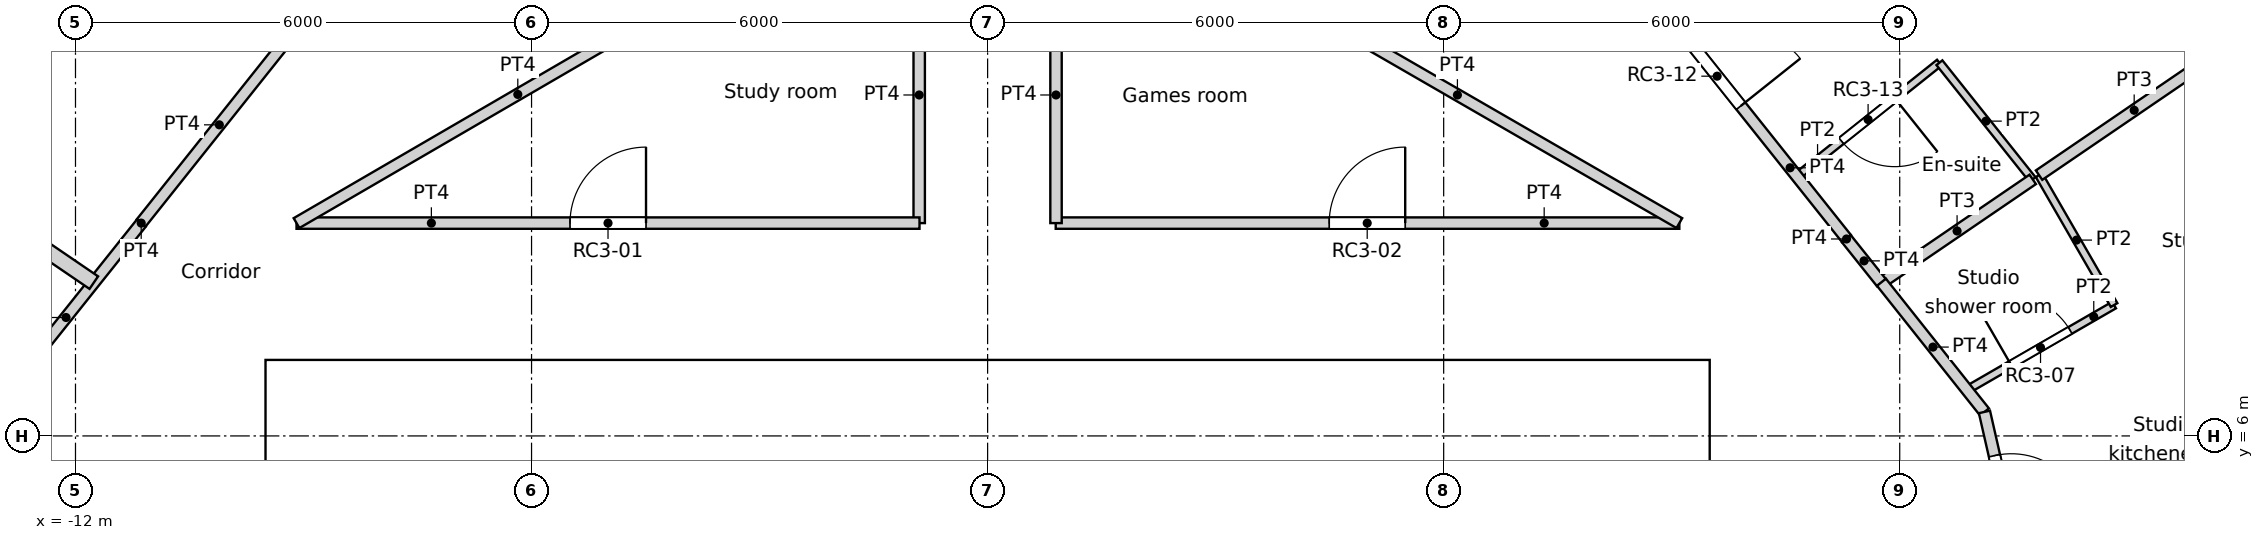
"""IFC4 building model, lengths in metres.
Left out: names, types, materials, properties, quantities, classifications, styles, units other than length and angle.
Written with IfcOpenShell. Run it as: python <this file> out.ifc"""

import sys

from ifc_helpers import new_model, si_unit, direction, frame, frame_2d, origin, origin_2d, place, context, subcontext, project, spatial, rectangle, circle, extrude, element, fill, save


model = new_model("IFC4")
c1 = context("Model", 3, precision=1e-05, world=origin(), true_north=direction((0.0, 1.0)))
c2 = subcontext(c1, "Body", "Model", "MODEL_VIEW")
j1 = project(units=[si_unit("LENGTHUNIT", "METRE"), si_unit("PLANEANGLEUNIT", "RADIAN")], contexts=[c1])
p1 = place(None, origin())
s1 = spatial("IfcSite", under=j1, at=p1, CompositionType="ELEMENT")
p2 = place(p1, origin())
s2 = spatial("IfcBuilding", under=s1, at=p2, CompositionType="ELEMENT")
p3 = place(p2, frame((0.0, 0.0, 252.6)))
s3 = spatial("IfcBuildingStorey", under=s2, at=p3, CompositionType="ELEMENT", Elevation=252.6)
p4 = place(p3, frame((15.552, 10.603, 0.0), z_axis=(0.0, 0.0, 1.0), x_axis=(1.0, 0.0, 0.0)))
e1 = element("IfcColumn", 1, at=p4, inside=s3, PredefinedType="COLUMN", context=c2, shape_type="SweptSolid", body=[
    extrude(circle(Radius=0.55, at=origin_2d()), origin(), (0.0, 0.0, 1.0), 3.6),
])
p5 = place(p3, frame((-9.5, 6.7, 0.0), z_axis=(0.0, 0.0, 1.0), x_axis=(1.0, 0.0, 0.0)))
e2 = element("IfcWall", 2, at=p5, inside=s3, PredefinedType="SOLIDWALL", context=c2, shape_type="SweptSolid", body=[
    extrude(rectangle(XDim=19.0, YDim=0.6, at=frame_2d((9.5, 0.0))), origin(), (0.0, 0.0, 1.0), 3.6),
])
p6 = place(p5, frame((5.35, 0.0, 0.0)))
e3 = element("IfcOpeningElement", 3, at=p6, cuts=e2, PredefinedType="OPENING", context=c2, shape_type="SweptSolid", body=[
    extrude(rectangle(XDim=1.7, YDim=2.1, at=frame_2d((0.85, 1.05))), frame((0.0, 0.3, 0.0), z_axis=(0.0, -1.0, 0.0), x_axis=(1.0, 0.0, 0.0)), (0.0, 0.0, 1.0), 0.6),
])
p7 = place(p3, frame((-9.2, -6.4, 0.0), z_axis=(0.0, 0.0, 1.0), x_axis=(0.0, 1.0, 0.0)))
e4 = element("IfcWall", 4, at=p7, inside=s3, PredefinedType="SOLIDWALL", context=c2, shape_type="SweptSolid", body=[
    extrude(rectangle(XDim=12.8, YDim=0.6, at=frame_2d((6.4, 0.0))), origin(), (0.0, 0.0, 1.0), 3.6),
])
p8 = place(p3, frame((9.2, -6.4, 0.0), z_axis=(0.0, 0.0, 1.0), x_axis=(0.0, 1.0, 0.0)))
e5 = element("IfcWall", 5, at=p8, inside=s3, PredefinedType="SOLIDWALL", context=c2, shape_type="SweptSolid", body=[
    extrude(rectangle(XDim=12.8, YDim=0.6, at=frame_2d((6.4, 0.0))), origin(), (0.0, 0.0, 1.0), 3.6),
])
p9 = place(p8, frame((6.4, 0.0, 0.0)))
e6 = element("IfcOpeningElement", 6, at=p9, cuts=e5, PredefinedType="OPENING", context=c2, shape_type="SweptSolid", body=[
    extrude(rectangle(XDim=1.8, YDim=2.1, at=frame_2d((0.9, 1.05))), frame((0.0, 0.3, 0.0), z_axis=(0.0, -1.0, 0.0), x_axis=(1.0, 0.0, 0.0)), (0.0, 0.0, 1.0), 0.6),
])
for number, where, z_axis, x_axis in (
    (7, (-2.25, 3.25, 0.0), (0.0, 0.0, 1.0), (0.0, 1.0, 0.0)),
    (8, (0.55, 3.25, 0.0), (0.0, 0.0, 1.0), (0.0, 1.0, 0.0)),
    (9, (3.35, 3.25, 0.0), (0.0, 0.0, 1.0), (0.0, 1.0, 0.0)),
    (10, (6.15, 3.25, 0.0), (0.0, 0.0, 1.0), (0.0, 1.0, 0.0)),
):
    element("IfcWall", number, at=place(p3, frame(where, z_axis=z_axis, x_axis=x_axis)), inside=s3, PredefinedType="SOLIDWALL", context=c2, shape_type="SweptSolid", body=[
        extrude(rectangle(XDim=3.15, YDim=0.3, at=frame_2d((1.575, 0.0))), origin(), (0.0, 0.0, 1.0), 3.25),
    ])
p10 = place(p3, frame((-9.092, 8.8, 0.0), z_axis=(0.0, 0.0, 1.0), x_axis=(0.864470922103, 0.502682827277, 0.0)))
e11 = element("IfcWall", 11, at=p10, inside=s3, PredefinedType="PARTITIONING", context=c2, shape_type="SweptSolid", body=[
    extrude(rectangle(XDim=6.735, YDim=0.15, at=frame_2d((3.368, 0.0))), origin(), (0.0, 0.0, 1.0), 3.25),
])
p11 = place(p3, frame((-9.092, 8.8, 0.0), z_axis=(0.0, 0.0, 1.0), x_axis=(1.0, 0.0, 0.0)))
e12 = element("IfcWall", 12, at=p11, inside=s3, PredefinedType="PARTITIONING", context=c2, shape_type="SweptSolid", body=[
    extrude(rectangle(XDim=8.196, YDim=0.15, at=frame_2d((4.098, 0.0))), origin(), (0.0, 0.0, 1.0), 3.25),
])
p12 = place(p11, frame((3.598, 0.0, 0.0)))
e13 = element("IfcOpeningElement", 13, at=p12, cuts=e12, PredefinedType="OPENING", context=c2, shape_type="SweptSolid", body=[
    extrude(rectangle(XDim=1.0, YDim=2.04, at=frame_2d((0.5, 1.02))), frame((0.0, 0.075, 0.0), z_axis=(0.0, -1.0, 0.0), x_axis=(1.0, 0.0, 0.0)), (0.0, 0.0, 1.0), 0.15),
])
p13 = place(p3, frame((0.896, 8.8, 0.0), z_axis=(0.0, 0.0, 1.0), x_axis=(1.0, 0.0, 0.0)))
e14 = element("IfcWall", 14, at=p13, inside=s3, PredefinedType="PARTITIONING", context=c2, shape_type="SweptSolid", body=[
    extrude(rectangle(XDim=8.205, YDim=0.15, at=frame_2d((4.102, 0.0))), origin(), (0.0, 0.0, 1.0), 3.25),
])
p14 = place(p13, frame((3.598, 0.0, 0.0)))
e15 = element("IfcOpeningElement", 15, at=p14, cuts=e14, PredefinedType="OPENING", context=c2, shape_type="SweptSolid", body=[
    extrude(rectangle(XDim=1.0, YDim=2.04, at=frame_2d((0.5, 1.02))), frame((0.0, 0.075, 0.0), z_axis=(0.0, -1.0, 0.0), x_axis=(1.0, 0.0, 0.0)), (0.0, 0.0, 1.0), 0.15),
])
p15 = place(p3, frame((9.079, 11.384, 0.0), z_axis=(0.0, 0.0, 1.0), x_axis=(0.623165080354, -0.782090328944, 0.0)))
e16 = element("IfcWall", 16, at=p15, inside=s3, PredefinedType="PARTITIONING", context=c2, shape_type="SweptSolid", body=[
    extrude(rectangle(XDim=3.564, YDim=0.15, at=frame_2d((1.782, 0.0))), origin(), (0.0, 0.0, 1.0), 3.25),
])
p16 = place(p15, frame((0.332, 0.0, 0.0)))
e17 = element("IfcOpeningElement", 17, at=p16, cuts=e16, PredefinedType="OPENING", context=c2, shape_type="SweptSolid", body=[
    extrude(rectangle(XDim=1.0, YDim=2.1, at=frame_2d((0.5, 1.05))), frame((0.0, 0.075, 0.0), z_axis=(0.0, -1.0, 0.0), x_axis=(1.0, 0.0, 0.0)), (0.0, 0.0, 1.0), 0.15),
])
p17 = place(p3, frame((11.3, 8.586, 0.0), z_axis=(0.0, 0.0, 1.0), x_axis=(0.0, 1.0, 0.0)))
e18 = element("IfcWall", 18, at=p17, inside=s3, PredefinedType="PARTITIONING", context=c2, shape_type="SweptSolid", body=[
    extrude(rectangle(XDim=0.01, YDim=0.15, at=frame_2d((0.005, 0.0))), origin(), (0.0, 0.0, 1.0), 3.25),
])
p18 = place(p3, frame((-11.134, 8.8, 0.0), z_axis=(0.0, 0.0, 1.0), x_axis=(-1.0, 0.0, 0.0)))
e19 = element("IfcWall", 19, at=p18, inside=s3, PredefinedType="PARTITIONING", context=c2, shape_type="SweptSolid", body=[
    extrude(rectangle(XDim=0.003, YDim=0.15, at=frame_2d((0.001, 0.0))), origin(), (0.0, 0.0, 1.0), 3.25),
])
p19 = place(p3, frame((-11.136, 8.802, 0.0), z_axis=(0.0, 0.0, 1.0), x_axis=(0.623151397235, 0.782101231379, 0.0)))
e20 = element("IfcWall", 20, at=p19, inside=s3, PredefinedType="PARTITIONING", context=c2, shape_type="SweptSolid", body=[
    extrude(rectangle(XDim=3.301, YDim=0.15, at=frame_2d((1.65, 0.0))), origin(), (0.0, 0.0, 1.0), 3.25),
])
p20 = place(p3, frame((13.115, 6.316, 0.0), z_axis=(0.0, 0.0, 1.0), x_axis=(0.222568978642, -0.97491694505, 0.0)))
e21 = element("IfcWall", 21, at=p20, inside=s3, PredefinedType="PARTITIONING", context=c2, shape_type="SweptSolid", body=[
    extrude(rectangle(XDim=6.479, YDim=0.15, at=frame_2d((3.239, 0.0))), origin(), (0.0, 0.0, 1.0), 3.25),
])
p21 = place(p20, frame((2.911, 0.0, 0.0)))
e22 = element("IfcOpeningElement", 22, at=p21, cuts=e21, PredefinedType="OPENING", context=c2, shape_type="SweptSolid", body=[
    extrude(rectangle(XDim=1.0, YDim=2.1, at=frame_2d((0.5, 1.05))), frame((0.0, 0.075, 0.0), z_axis=(0.0, -1.0, 0.0), x_axis=(1.0, 0.0, 0.0)), (0.0, 0.0, 1.0), 0.15),
])
p22 = place(p20, frame((0.59, 0.0, 0.0)))
e23 = element("IfcOpeningElement", 23, at=p22, cuts=e21, PredefinedType="OPENING", context=c2, shape_type="SweptSolid", body=[
    extrude(rectangle(XDim=1.0, YDim=2.1, at=frame_2d((0.5, 1.05))), frame((0.0, 0.075, 0.0), z_axis=(0.0, -1.0, 0.0), x_axis=(1.0, 0.0, 0.0)), (0.0, 0.0, 1.0), 0.15),
])
p23 = place(p3, frame((11.76, 8.022, 0.0), z_axis=(0.0, 0.0, 1.0), x_axis=(0.62206805366, -0.782963177049, 0.0)))
e24 = element("IfcWall", 24, at=p23, inside=s3, PredefinedType="PARTITIONING", context=c2, shape_type="SweptSolid", body=[
    extrude(rectangle(XDim=2.179, YDim=0.15, at=frame_2d((1.089, 0.0))), origin(), (0.0, 0.0, 1.0), 3.25),
])
p24 = place(p3, frame((11.3, 8.592, 0.0), z_axis=(0.0, 0.0, 1.0), x_axis=(0.623405636383, -0.781898594785, 0.0)))
e25 = element("IfcWall", 25, at=p24, inside=s3, PredefinedType="PARTITIONING", context=c2, shape_type="SweptSolid", body=[
    extrude(rectangle(XDim=0.74, YDim=0.15, at=frame_2d((0.37, 0.0))), origin(), (0.0, 0.0, 1.0), 3.25),
])
p25 = place(p3, frame((-0.9, 8.8, 0.0), z_axis=(0.0, 0.0, 1.0), x_axis=(0.0, 1.0, 0.0)))
e26 = element("IfcWall", 26, at=p25, inside=s3, PredefinedType="PARTITIONING", context=c2, shape_type="SweptSolid", body=[
    extrude(rectangle(XDim=3.371, YDim=0.15, at=frame_2d((1.686, 0.0))), origin(), (0.0, 0.0, 1.0), 3.25),
])
p26 = place(p3, frame((3.261, 12.171, 0.0), z_axis=(0.0, 0.0, 1.0), x_axis=(0.866066809554, -0.499928276245, 0.0)))
e27 = element("IfcWall", 27, at=p26, inside=s3, PredefinedType="PARTITIONING", context=c2, shape_type="SweptSolid", body=[
    extrude(rectangle(XDim=6.743, YDim=0.15, at=frame_2d((3.371, 0.0))), origin(), (0.0, 0.0, 1.0), 3.25),
])
p27 = place(p3, frame((0.9, 8.8, 0.0), z_axis=(0.0, 0.0, 1.0), x_axis=(0.0, 1.0, 0.0)))
e28 = element("IfcWall", 28, at=p27, inside=s3, PredefinedType="PARTITIONING", context=c2, shape_type="SweptSolid", body=[
    extrude(rectangle(XDim=3.371, YDim=0.15, at=frame_2d((1.686, 0.0))), origin(), (0.0, 0.0, 1.0), 3.25),
])
p28 = place(p3, frame((-13.115, 6.316, 0.0), z_axis=(0.0, 0.0, 1.0), x_axis=(0.623560523309, 0.781775078761, 0.0)))
e29 = element("IfcWall", 29, at=p28, inside=s3, PredefinedType="PARTITIONING", context=c2, shape_type="SweptSolid", body=[
    extrude(rectangle(XDim=3.177, YDim=0.15, at=frame_2d((1.589, 0.0))), origin(), (0.0, 0.0, 1.0), 3.25),
])
p29 = place(p3, frame((12.885, 6.605, 0.0), z_axis=(0.0, 0.0, 1.0), x_axis=(0.866076416361, 0.499911633214, 0.0)))
e30 = element("IfcWall", 30, at=p29, inside=s3, PredefinedType="PARTITIONING", context=c2, shape_type="SweptSolid", body=[
    extrude(rectangle(XDim=2.234, YDim=0.1, at=frame_2d((1.117, 0.0))), origin(), (0.0, 0.0, 1.0), 3.25),
])
p30 = place(p29, frame((0.667, 0.0, 0.0)))
e31 = element("IfcOpeningElement", 31, at=p30, cuts=e30, PredefinedType="OPENING", context=c2, shape_type="SweptSolid", body=[
    extrude(rectangle(XDim=0.9, YDim=2.04, at=frame_2d((0.45, 1.02))), frame((0.0, 0.05, 0.0), z_axis=(0.0, -1.0, 0.0), x_axis=(1.0, 0.0, 0.0)), (0.0, 0.0, 1.0), 0.1),
])
p31 = place(p3, frame((13.833, 9.431, 0.0), z_axis=(0.0, 0.0, 1.0), x_axis=(0.500143626598, -0.865942465048, 0.0)))
e32 = element("IfcWall", 32, at=p31, inside=s3, PredefinedType="PARTITIONING", context=c2, shape_type="SweptSolid", body=[
    extrude(rectangle(XDim=1.974, YDim=0.1, at=frame_2d((0.987, 0.0))), origin(), (0.0, 0.0, 1.0), 3.25),
])
p32 = place(p3, frame((13.833, 9.431, 0.0), z_axis=(0.0, 0.0, 1.0), x_axis=(0.826152320289, 0.56344684193, 0.0)))
e33 = element("IfcWall", 33, at=p32, inside=s3, PredefinedType="PARTITIONING", context=c2, shape_type="SweptSolid", body=[
    extrude(rectangle(XDim=3.03, YDim=0.15, at=frame_2d((1.515, 0.0))), origin(), (0.0, 0.0, 1.0), 3.25),
])
p33 = place(p3, frame((11.759, 8.017, 0.0), z_axis=(0.0, 0.0, 1.0), x_axis=(0.826143746222, 0.563459413426, 0.0)))
e34 = element("IfcWall", 34, at=p33, inside=s3, PredefinedType="PARTITIONING", context=c2, shape_type="SweptSolid", body=[
    extrude(rectangle(XDim=2.41, YDim=0.15, at=frame_2d((1.205, 0.0))), origin(), (0.0, 0.0, 1.0), 3.25),
])
p34 = place(p3, frame((12.522, 10.91, 0.0), z_axis=(0.0, 0.0, 1.0), x_axis=(0.623330716607, -0.781958322249, 0.0)))
e35 = element("IfcWall", 35, at=p34, inside=s3, PredefinedType="PARTITIONING", context=c2, shape_type="SweptSolid", body=[
    extrude(rectangle(XDim=1.965, YDim=0.1, at=frame_2d((0.983, 0.0))), origin(), (0.0, 0.0, 1.0), 3.25),
])
p35 = place(p3, frame((10.645, 9.413, 0.0), z_axis=(0.0, 0.0, 1.0), x_axis=(0.781830263661, 0.623491330191, 0.0)))
e36 = element("IfcWall", 36, at=p35, inside=s3, PredefinedType="PARTITIONING", context=c2, shape_type="SweptSolid", body=[
    extrude(rectangle(XDim=2.401, YDim=0.1, at=frame_2d((1.2, 0.0))), origin(), (0.0, 0.0, 1.0), 3.25),
])
p36 = place(p35, frame((0.751, 0.0, 0.0)))
e37 = element("IfcOpeningElement", 37, at=p36, cuts=e36, PredefinedType="OPENING", context=c2, shape_type="SweptSolid", body=[
    extrude(rectangle(XDim=0.9, YDim=2.04, at=frame_2d((0.45, 1.02))), frame((0.0, 0.05, 0.0), z_axis=(0.0, -1.0, 0.0), x_axis=(1.0, 0.0, 0.0)), (0.0, 0.0, 1.0), 0.1),
])
p37 = place(p3, frame((-16.336, 11.138, 0.0), z_axis=(0.0, 0.0, 1.0), x_axis=(0.826207761897, -0.563365542238, 0.0)))
e38 = element("IfcWall", 38, at=p37, inside=s3, PredefinedType="PARTITIONING", context=c2, shape_type="SweptSolid", body=[
    extrude(rectangle(XDim=5.54, YDim=0.2, at=frame_2d((2.77, 0.0))), origin(), (0.0, 0.0, 1.0), 3.25),
])
p38 = place(p6, origin())
e39 = element("IfcDoor", 39, at=p38, inside=s3, OperationType="DOUBLE_DOOR_SINGLE_SWING", PredefinedType="DOOR", context=c2, shape_type="SweptSolid", body=[
    extrude(rectangle(XDim=1.7, YDim=2.1, at=frame_2d((0.85, 1.05))), frame((0.0, 0.025, 0.0), z_axis=(0.0, -1.0, 0.0), x_axis=(1.0, 0.0, 0.0)), (0.0, 0.0, 1.0), 0.05),
])
fill(e3, e39)
p39 = place(p12, origin())
e40 = element("IfcDoor", 40, at=p39, inside=s3, OperationType="SINGLE_SWING_RIGHT", PredefinedType="DOOR", context=c2, shape_type="SweptSolid", body=[
    extrude(rectangle(XDim=1.0, YDim=2.04, at=frame_2d((0.5, 1.02))), frame((0.0, 0.025, 0.0), z_axis=(0.0, -1.0, 0.0), x_axis=(1.0, 0.0, 0.0)), (0.0, 0.0, 1.0), 0.05),
])
fill(e13, e40)
p40 = place(p14, origin())
e41 = element("IfcDoor", 41, at=p40, inside=s3, OperationType="SINGLE_SWING_RIGHT", PredefinedType="DOOR", context=c2, shape_type="SweptSolid", body=[
    extrude(rectangle(XDim=1.0, YDim=2.04, at=frame_2d((0.5, 1.02))), frame((0.0, 0.025, 0.0), z_axis=(0.0, -1.0, 0.0), x_axis=(1.0, 0.0, 0.0)), (0.0, 0.0, 1.0), 0.05),
])
fill(e15, e41)
p41 = place(p30, origin())
e42 = element("IfcDoor", 42, at=p41, inside=s3, OperationType="SINGLE_SWING_LEFT", PredefinedType="DOOR", context=c2, shape_type="SweptSolid", body=[
    extrude(rectangle(XDim=0.9, YDim=2.04, at=frame_2d((0.45, 1.02))), frame((0.0, 0.025, 0.0), z_axis=(0.0, -1.0, 0.0), x_axis=(1.0, 0.0, 0.0)), (0.0, 0.0, 1.0), 0.05),
])
fill(e31, e42)
p42 = place(p22, origin())
e43 = element("IfcDoor", 43, at=p42, inside=s3, OperationType="SINGLE_SWING_RIGHT", PredefinedType="DOOR", context=c2, shape_type="SweptSolid", body=[
    extrude(rectangle(XDim=1.0, YDim=2.1, at=frame_2d((0.5, 1.05))), frame((0.0, 0.025, 0.0), z_axis=(0.0, -1.0, 0.0), x_axis=(1.0, 0.0, 0.0)), (0.0, 0.0, 1.0), 0.05),
])
fill(e23, e43)
p43 = place(p16, origin())
e44 = element("IfcDoor", 44, at=p43, inside=s3, OperationType="SINGLE_SWING_RIGHT", PredefinedType="DOOR", context=c2, shape_type="SweptSolid", body=[
    extrude(rectangle(XDim=1.0, YDim=2.1, at=frame_2d((0.5, 1.05))), frame((0.0, 0.025, 0.0), z_axis=(0.0, -1.0, 0.0), x_axis=(1.0, 0.0, 0.0)), (0.0, 0.0, 1.0), 0.05),
])
fill(e17, e44)
p44 = place(p36, origin())
e45 = element("IfcDoor", 45, at=p44, inside=s3, OperationType="SINGLE_SWING_LEFT", PredefinedType="DOOR", context=c2, shape_type="SweptSolid", body=[
    extrude(rectangle(XDim=0.9, YDim=2.04, at=frame_2d((0.45, 1.02))), frame((0.0, 0.025, 0.0), z_axis=(0.0, -1.0, 0.0), x_axis=(1.0, 0.0, 0.0)), (0.0, 0.0, 1.0), 0.05),
])
fill(e37, e45)
save(model, sys.argv[1])
